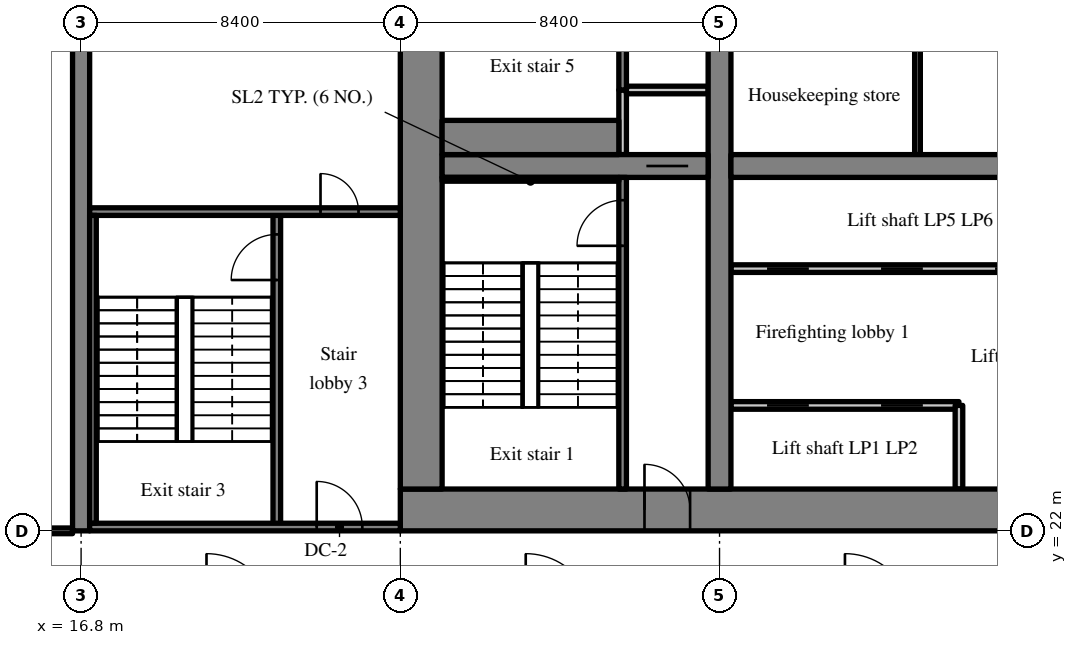
"""IFC4 building model, lengths in metres.
Left out: names, types, materials, properties, quantities, classifications, styles, units other than length and angle.
Written with IfcOpenShell. Run it as: python <this file> out.ifc"""

import sys

from ifc_helpers import new_model, si_unit, direction, frame, frame_2d, origin, place, context, subcontext, project, spatial, rectangle, extrude, source, transform, mapped, element, fill, save


model = new_model("IFC4")
c1 = context("Model", 3, precision=1e-05, world=origin(), true_north=direction((0.0, 1.0)))
c2 = subcontext(c1, "Body", "Model", "MODEL_VIEW")
j1 = project(units=[si_unit("LENGTHUNIT", "METRE"), si_unit("PLANEANGLEUNIT", "RADIAN")], contexts=[c1])
p1 = place(None, origin())
s1 = spatial("IfcSite", under=j1, at=p1, CompositionType="ELEMENT")
p2 = place(p1, origin())
s2 = spatial("IfcBuilding", under=s1, at=p2, CompositionType="ELEMENT")
p3 = place(p2, frame((0.0, 0.0, 6.0)))
s3 = spatial("IfcBuildingStorey", under=s2, at=p3, CompositionType="ELEMENT", Elevation=6.0)
m1 = source(origin(), c2, "Body", "SweptSolid", [
    extrude(rectangle(XDim=50.4, YDim=1.1, at=frame_2d((25.2, 0.0))), origin(), (0.0, 0.0, 1.0), 5.12),
])
p4 = place(p3, frame((25.2, 22.55, 0.0), z_axis=(0.0, 0.0, 1.0), x_axis=(1.0, 0.0, 0.0)))
e1 = element("IfcWall", 1, at=p4, inside=s3, PredefinedType="SHEAR", context=c2, shape_type="MappedRepresentation", body=[
    mapped(m1, transform((0.0, 0.0, 0.0), scale=1.0)),
])
m2 = source(origin(), c2, "Body", "SweptSolid", [
    extrude(rectangle(XDim=1.8, YDim=2.1, at=frame_2d((0.9, 1.05))), frame((0.0, 0.56, 0.0), z_axis=(0.0, -1.0, 0.0), x_axis=(1.0, 0.0, 0.0)), (0.0, 0.0, 1.0), 1.12),
])
p5 = place(p4, frame((15.9, 0.0, 0.0)))
e2 = element("IfcOpeningElement", 2, at=p5, cuts=e1, PredefinedType="OPENING", context=c2, shape_type="MappedRepresentation", body=[
    mapped(m2, transform((0.0, 0.0, 0.0), scale=1.0)),
])
m3 = source(origin(), c2, "Body", "SweptSolid", [
    extrude(rectangle(XDim=1.2, YDim=2.1, at=frame_2d((0.6, 1.05))), frame((0.0, 0.56, 0.0), z_axis=(0.0, -1.0, 0.0), x_axis=(1.0, 0.0, 0.0)), (0.0, 0.0, 1.0), 1.12),
])
p6 = place(p4, frame((27.0, 0.0, 0.0)))
e3 = element("IfcOpeningElement", 3, at=p6, cuts=e1, PredefinedType="OPENING", context=c2, shape_type="MappedRepresentation", body=[
    mapped(m3, transform((0.0, 0.0, 0.0), scale=1.0)),
])
m4 = source(origin(), c2, "Body", "SweptSolid", [
    extrude(rectangle(XDim=0.9, YDim=2.1, at=frame_2d((0.45, 1.05))), frame((0.0, 0.56, 0.0), z_axis=(0.0, -1.0, 0.0), x_axis=(1.0, 0.0, 0.0)), (0.0, 0.0, 1.0), 1.12),
])
p7 = place(p4, frame((34.5, 0.0, 0.0)))
e4 = element("IfcOpeningElement", 4, at=p7, cuts=e1, PredefinedType="OPENING", context=c2, shape_type="MappedRepresentation", body=[
    mapped(m4, transform((0.0, 0.0, 0.0), scale=1.0)),
])
p8 = place(p4, frame((31.5, 0.0, 0.0)))
e5 = element("IfcOpeningElement", 5, at=p8, cuts=e1, PredefinedType="OPENING", context=c2, shape_type="MappedRepresentation", body=[
    mapped(m4, transform((0.0, 0.0, 0.0), scale=1.0)),
])
p9 = place(p4, frame((39.75, 0.0, 0.0)))
e6 = element("IfcOpeningElement", 6, at=p9, cuts=e1, PredefinedType="OPENING", context=c2, shape_type="MappedRepresentation", body=[
    mapped(m4, transform((0.0, 0.0, 0.0), scale=1.0)),
])
p10 = place(p4, frame((36.75, 0.0, 0.0)))
e7 = element("IfcOpeningElement", 7, at=p10, cuts=e1, PredefinedType="OPENING", context=c2, shape_type="MappedRepresentation", body=[
    mapped(m4, transform((0.0, 0.0, 0.0), scale=1.0)),
])
p11 = place(p4, frame((6.425, 0.0, 0.0)))
e8 = element("IfcOpeningElement", 8, at=p11, cuts=e1, PredefinedType="OPENING", context=c2, shape_type="MappedRepresentation", body=[
    mapped(m3, transform((0.0, 0.0, 0.0), scale=1.0)),
])
p12 = place(p4, frame((47.675, 0.0, 0.0)))
e9 = element("IfcOpeningElement", 9, at=p12, cuts=e1, PredefinedType="OPENING", context=c2, shape_type="MappedRepresentation", body=[
    mapped(m3, transform((0.0, 0.0, 0.0), scale=1.0)),
])
m5 = source(origin(), c2, "Body", "SweptSolid", [
    extrude(rectangle(XDim=17.8, YDim=1.1, at=frame_2d((8.9, 0.0))), origin(), (0.0, 0.0, 1.0), 5.12),
])
p13 = place(p3, frame((25.75, 23.1, 0.0), z_axis=(0.0, 0.0, 1.0), x_axis=(0.0, 1.0, 0.0)))
e10 = element("IfcWall", 10, at=p13, inside=s3, PredefinedType="SHEAR", context=c2, shape_type="MappedRepresentation", body=[
    mapped(m5, transform((0.0, 0.0, 0.0), scale=1.0)),
])
m6 = source(origin(), c2, "Body", "SweptSolid", [
    extrude(rectangle(XDim=17.8, YDim=0.6, at=frame_2d((8.9, 0.0))), origin(), (0.0, 0.0, 1.0), 5.12),
])
p14 = place(p3, frame((33.6, 23.1, 0.0), z_axis=(0.0, 0.0, 1.0), x_axis=(0.0, 1.0, 0.0)))
e11 = element("IfcWall", 11, at=p14, inside=s3, PredefinedType="SHEAR", context=c2, shape_type="MappedRepresentation", body=[
    mapped(m6, transform((0.0, 0.0, 0.0), scale=1.0)),
])
m7 = source(origin(), c2, "Body", "SweptSolid", [
    extrude(rectangle(XDim=1.1, YDim=2.1, at=frame_2d((0.55, 1.05))), frame((0.0, 0.31, 0.0), z_axis=(0.0, -1.0, 0.0), x_axis=(1.0, 0.0, 0.0)), (0.0, 0.0, 1.0), 0.62),
])
p15 = place(p14, frame((12.35, 0.0, 0.0)))
e12 = element("IfcOpeningElement", 12, at=p15, cuts=e11, PredefinedType="OPENING", context=c2, shape_type="MappedRepresentation", body=[
    mapped(m7, transform((0.0, 0.0, 0.0), scale=1.0)),
])
m8 = source(origin(), c2, "Body", "SweptSolid", [
    extrude(rectangle(XDim=7.0, YDim=0.6, at=frame_2d((3.5, 0.0))), origin(), (0.0, 0.0, 1.0), 5.12),
])
p16 = place(p3, frame((26.3, 31.6, 0.0), z_axis=(0.0, 0.0, 1.0), x_axis=(1.0, 0.0, 0.0)))
e13 = element("IfcWall", 13, at=p16, inside=s3, PredefinedType="SHEAR", context=c2, shape_type="MappedRepresentation", body=[
    mapped(m8, transform((0.0, 0.0, 0.0), scale=1.0)),
])
p17 = place(p16, frame((5.375, 0.0, 0.0)))
e14 = element("IfcOpeningElement", 14, at=p17, cuts=e13, PredefinedType="OPENING", context=c2, shape_type="MappedRepresentation", body=[
    mapped(m7, transform((0.0, 0.0, 0.0), scale=1.0)),
])
m9 = source(origin(), c2, "Body", "SweptSolid", [
    extrude(rectangle(XDim=16.2, YDim=0.6, at=frame_2d((8.1, 0.0))), origin(), (0.0, 0.0, 1.0), 5.12),
])
p18 = place(p3, frame((33.9, 31.6, 0.0), z_axis=(0.0, 0.0, 1.0), x_axis=(1.0, 0.0, 0.0)))
e15 = element("IfcWall", 15, at=p18, inside=s3, PredefinedType="SHEAR", context=c2, shape_type="MappedRepresentation", body=[
    mapped(m9, transform((0.0, 0.0, 0.0), scale=1.0)),
])
m10 = source(origin(), c2, "Body", "SweptSolid", [
    extrude(rectangle(XDim=1.0, YDim=2.1, at=frame_2d((0.5, 1.05))), frame((0.0, 0.31, 0.0), z_axis=(0.0, -1.0, 0.0), x_axis=(1.0, 0.0, 0.0)), (0.0, 0.0, 1.0), 0.62),
])
p19 = place(p18, frame((14.65, 0.0, 0.0)))
e16 = element("IfcOpeningElement", 16, at=p19, cuts=e15, PredefinedType="OPENING", context=c2, shape_type="MappedRepresentation", body=[
    mapped(m10, transform((0.0, 0.0, 0.0), scale=1.0)),
])
m11 = source(origin(), c2, "Body", "SweptSolid", [
    extrude(rectangle(XDim=20.0, YDim=0.45, at=frame_2d((10.0, 0.0))), origin(), (0.0, 0.0, 1.0), 5.12),
])
p20 = place(p3, frame((16.8, 22.0, 0.0), z_axis=(0.0, 0.0, 1.0), x_axis=(0.0, 1.0, 0.0)))
e17 = element("IfcWall", 17, at=p20, inside=s3, PredefinedType="SHEAR", context=c2, shape_type="MappedRepresentation", body=[
    mapped(m11, transform((0.0, 0.0, 0.0), scale=1.0)),
])
m12 = source(origin(), c2, "Body", "SweptSolid", [
    extrude(rectangle(XDim=6.0, YDim=0.2, at=frame_2d((3.0, 0.0))), origin(), (0.0, 0.0, 1.0), 5.12),
])
p21 = place(p3, frame((33.9, 25.3, 0.0), z_axis=(0.0, 0.0, 1.0), x_axis=(1.0, 0.0, 0.0)))
e18 = element("IfcWall", 18, at=p21, inside=s3, PredefinedType="SOLIDWALL", context=c2, shape_type="MappedRepresentation", body=[
    mapped(m12, transform((0.0, 0.0, 0.0), scale=1.0)),
])
m13 = source(origin(), c2, "Body", "SweptSolid", [
    extrude(rectangle(XDim=1.1, YDim=2.1, at=frame_2d((0.55, 1.05))), frame((0.0, 0.11, 0.0), z_axis=(0.0, -1.0, 0.0), x_axis=(1.0, 0.0, 0.0)), (0.0, 0.0, 1.0), 0.22),
])
p22 = place(p21, frame((0.95, 0.0, 0.0)))
e19 = element("IfcOpeningElement", 19, at=p22, cuts=e18, PredefinedType="OPENING", context=c2, shape_type="MappedRepresentation", body=[
    mapped(m13, transform((0.0, 0.0, 0.0), scale=1.0)),
])
p23 = place(p21, frame((3.95, 0.0, 0.0)))
e20 = element("IfcOpeningElement", 20, at=p23, cuts=e18, PredefinedType="OPENING", context=c2, shape_type="MappedRepresentation", body=[
    mapped(m13, transform((0.0, 0.0, 0.0), scale=1.0)),
])
m14 = source(origin(), c2, "Body", "SweptSolid", [
    extrude(rectangle(XDim=12.0, YDim=0.2, at=frame_2d((6.0, 0.0))), origin(), (0.0, 0.0, 1.0), 5.12),
])
p24 = place(p3, frame((33.9, 28.9, 0.0), z_axis=(0.0, 0.0, 1.0), x_axis=(1.0, 0.0, 0.0)))
e21 = element("IfcWall", 21, at=p24, inside=s3, PredefinedType="SOLIDWALL", context=c2, shape_type="MappedRepresentation", body=[
    mapped(m14, transform((0.0, 0.0, 0.0), scale=1.0)),
])
p25 = place(p24, frame((0.95, 0.0, 0.0)))
e22 = element("IfcOpeningElement", 22, at=p25, cuts=e21, PredefinedType="OPENING", context=c2, shape_type="MappedRepresentation", body=[
    mapped(m13, transform((0.0, 0.0, 0.0), scale=1.0)),
])
p26 = place(p24, frame((3.95, 0.0, 0.0)))
e23 = element("IfcOpeningElement", 23, at=p26, cuts=e21, PredefinedType="OPENING", context=c2, shape_type="MappedRepresentation", body=[
    mapped(m13, transform((0.0, 0.0, 0.0), scale=1.0)),
])
p27 = place(p24, frame((6.95, 0.0, 0.0)))
e24 = element("IfcOpeningElement", 24, at=p27, cuts=e21, PredefinedType="OPENING", context=c2, shape_type="MappedRepresentation", body=[
    mapped(m13, transform((0.0, 0.0, 0.0), scale=1.0)),
])
p28 = place(p24, frame((9.95, 0.0, 0.0)))
e25 = element("IfcOpeningElement", 25, at=p28, cuts=e21, PredefinedType="OPENING", context=c2, shape_type="MappedRepresentation", body=[
    mapped(m13, transform((0.0, 0.0, 0.0), scale=1.0)),
])
m15 = source(origin(), c2, "Body", "SweptSolid", [
    extrude(rectangle(XDim=2.2, YDim=0.2, at=frame_2d((1.1, 0.0))), origin(), (0.0, 0.0, 1.0), 5.12),
])
p29 = place(p3, frame((39.9, 23.1, 0.0), z_axis=(0.0, 0.0, 1.0), x_axis=(0.0, 1.0, 0.0)))
e26 = element("IfcWall", 26, at=p29, inside=s3, PredefinedType="SOLIDWALL", context=c2, shape_type="MappedRepresentation", body=[
    mapped(m15, transform((0.0, 0.0, 0.0), scale=1.0)),
])
m16 = source(origin(), c2, "Body", "SweptSolid", [
    extrude(rectangle(XDim=3.1, YDim=0.15, at=frame_2d((1.55, 0.0))), origin(), (0.0, 0.0, 1.0), 5.12),
])
p30 = place(p3, frame((38.809, 31.9, 0.0), z_axis=(0.0, 0.0, 1.0), x_axis=(0.0, 1.0, 0.0)))
e27 = element("IfcWall", 27, at=p30, inside=s3, PredefinedType="PARTITIONING", context=c2, shape_type="MappedRepresentation", body=[
    mapped(m16, transform((0.0, 0.0, 0.0), scale=1.0)),
])
m17 = source(origin(), c2, "Body", "SweptSolid", [
    extrude(rectangle(XDim=8.2, YDim=0.2, at=frame_2d((4.1, 0.0))), origin(), (0.0, 0.0, 1.0), 5.12),
])
p31 = place(p3, frame((31.05, 23.1, 0.0), z_axis=(0.0, 0.0, 1.0), x_axis=(0.0, 1.0, 0.0)))
e28 = element("IfcWall", 28, at=p31, inside=s3, PredefinedType="SOLIDWALL", context=c2, shape_type="MappedRepresentation", body=[
    mapped(m17, transform((0.0, 0.0, 0.0), scale=1.0)),
])
m18 = source(origin(), c2, "Body", "SweptSolid", [
    extrude(rectangle(XDim=1.2, YDim=2.1, at=frame_2d((0.6, 1.05))), frame((0.0, 0.11, 0.0), z_axis=(0.0, -1.0, 0.0), x_axis=(1.0, 0.0, 0.0)), (0.0, 0.0, 1.0), 0.22),
])
p32 = place(p31, frame((6.4, 0.0, 0.0)))
e29 = element("IfcOpeningElement", 29, at=p32, cuts=e28, PredefinedType="OPENING", context=c2, shape_type="MappedRepresentation", body=[
    mapped(m18, transform((0.0, 0.0, 0.0), scale=1.0)),
])
m19 = source(origin(), c2, "Body", "SweptSolid", [
    extrude(rectangle(XDim=1.7, YDim=0.2, at=frame_2d((0.85, 0.0))), origin(), (0.0, 0.0, 1.0), 5.12),
])
p33 = place(p3, frame((31.05, 31.9, 0.0), z_axis=(0.0, 0.0, 1.0), x_axis=(0.0, 1.0, 0.0)))
e30 = element("IfcWall", 30, at=p33, inside=s3, PredefinedType="SOLIDWALL", context=c2, shape_type="MappedRepresentation", body=[
    mapped(m19, transform((0.0, 0.0, 0.0), scale=1.0)),
])
m20 = source(origin(), c2, "Body", "SweptSolid", [
    extrude(rectangle(XDim=2.15, YDim=0.2, at=frame_2d((1.075, 0.0))), origin(), (0.0, 0.0, 1.0), 5.12),
])
p34 = place(p3, frame((31.15, 33.6, 0.0), z_axis=(0.0, 0.0, 1.0), x_axis=(1.0, 0.0, 0.0)))
e31 = element("IfcWall", 31, at=p34, inside=s3, PredefinedType="SOLIDWALL", context=c2, shape_type="MappedRepresentation", body=[
    mapped(m20, transform((0.0, 0.0, 0.0), scale=1.0)),
])
m21 = source(origin(), c2, "Body", "SweptSolid", [
    extrude(rectangle(XDim=7.3, YDim=0.2, at=frame_2d((3.65, 0.0))), origin(), (0.0, 0.0, 1.0), 5.12),
])
p35 = place(p3, frame((31.05, 33.6, 0.0), z_axis=(0.0, 0.0, 1.0), x_axis=(0.0, 1.0, 0.0)))
e32 = element("IfcWall", 32, at=p35, inside=s3, PredefinedType="SOLIDWALL", context=c2, shape_type="MappedRepresentation", body=[
    mapped(m21, transform((0.0, 0.0, 0.0), scale=1.0)),
])
m22 = source(origin(), c2, "Body", "SweptSolid", [
    extrude(rectangle(XDim=1.8, YDim=2.1, at=frame_2d((0.9, 1.05))), frame((0.0, 0.11, 0.0), z_axis=(0.0, -1.0, 0.0), x_axis=(1.0, 0.0, 0.0)), (0.0, 0.0, 1.0), 0.22),
])
p36 = place(p35, frame((5.3, 0.0, 0.0)))
e33 = element("IfcOpeningElement", 33, at=p36, cuts=e32, PredefinedType="OPENING", context=c2, shape_type="MappedRepresentation", body=[
    mapped(m22, transform((0.0, 0.0, 0.0), scale=1.0)),
])
m23 = source(origin(), c2, "Body", "SweptSolid", [
    extrude(rectangle(XDim=8.3, YDim=0.2, at=frame_2d((4.15, 0.0))), origin(), (0.0, 0.0, 1.0), 5.12),
])
p37 = place(p3, frame((21.95, 22.1, 0.0), z_axis=(0.0, 0.0, 1.0), x_axis=(0.0, 1.0, 0.0)))
e34 = element("IfcWall", 34, at=p37, inside=s3, PredefinedType="SOLIDWALL", context=c2, shape_type="MappedRepresentation", body=[
    mapped(m23, transform((0.0, 0.0, 0.0), scale=1.0)),
])
p38 = place(p37, frame((6.5, 0.0, 0.0)))
e35 = element("IfcOpeningElement", 35, at=p38, cuts=e34, PredefinedType="OPENING", context=c2, shape_type="MappedRepresentation", body=[
    mapped(m18, transform((0.0, 0.0, 0.0), scale=1.0)),
])
m24 = source(origin(), c2, "Body", "SweptSolid", [
    extrude(rectangle(XDim=8.175, YDim=0.2, at=frame_2d((4.087, 0.0))), origin(), (0.0, 0.0, 1.0), 5.12),
])
p39 = place(p3, frame((17.025, 22.1, 0.0), z_axis=(0.0, 0.0, 1.0), x_axis=(1.0, 0.0, 0.0)))
e36 = element("IfcWall", 36, at=p39, inside=s3, PredefinedType="SOLIDWALL", context=c2, shape_type="MappedRepresentation", body=[
    mapped(m24, transform((0.0, 0.0, 0.0), scale=1.0)),
])
p40 = place(p39, frame((5.975, 0.0, 0.0)))
e37 = element("IfcOpeningElement", 37, at=p40, cuts=e36, PredefinedType="OPENING", context=c2, shape_type="MappedRepresentation", body=[
    mapped(m18, transform((0.0, 0.0, 0.0), scale=1.0)),
])
p41 = place(p3, frame((17.025, 30.4, 0.0), z_axis=(0.0, 0.0, 1.0), x_axis=(1.0, 0.0, 0.0)))
e38 = element("IfcWall", 38, at=p41, inside=s3, PredefinedType="SOLIDWALL", context=c2, shape_type="MappedRepresentation", body=[
    mapped(m24, transform((0.0, 0.0, 0.0), scale=1.0)),
])
m25 = source(origin(), c2, "Body", "SweptSolid", [
    extrude(rectangle(XDim=1.0, YDim=2.1, at=frame_2d((0.5, 1.05))), frame((0.0, 0.11, 0.0), z_axis=(0.0, -1.0, 0.0), x_axis=(1.0, 0.0, 0.0)), (0.0, 0.0, 1.0), 0.22),
])
p42 = place(p41, frame((6.075, 0.0, 0.0)))
e39 = element("IfcOpeningElement", 39, at=p42, cuts=e38, PredefinedType="OPENING", context=c2, shape_type="MappedRepresentation", body=[
    mapped(m25, transform((0.0, 0.0, 0.0), scale=1.0)),
])
m26 = source(origin(), c2, "Body", "SweptSolid", [
    extrude(rectangle(XDim=4.65, YDim=0.1, at=frame_2d((2.325, 0.0))), origin(), (0.0, 0.0, 1.0), 5.12),
])
p43 = place(p3, frame((26.3, 31.25, 0.0), z_axis=(0.0, 0.0, 1.0), x_axis=(1.0, 0.0, 0.0)))
e40 = element("IfcWall", 40, at=p43, inside=s3, PredefinedType="SOLIDWALL", context=c2, shape_type="MappedRepresentation", body=[
    mapped(m26, transform((0.0, 0.0, 0.0), scale=1.0)),
])
m27 = source(origin(), c2, "Body", "SweptSolid", [
    extrude(rectangle(XDim=8.1, YDim=0.175, at=frame_2d((4.05, 0.0))), origin(), (0.0, 0.0, 1.0), 5.12),
])
p44 = place(p3, frame((17.112, 22.2, 0.0), z_axis=(0.0, 0.0, 1.0), x_axis=(0.0, 1.0, 0.0)))
e41 = element("IfcWall", 41, at=p44, inside=s3, PredefinedType="SOLIDWALL", context=c2, shape_type="MappedRepresentation", body=[
    mapped(m27, transform((0.0, 0.0, 0.0), scale=1.0)),
])
m28 = source(origin(), c2, "Body", "SweptSolid", [
    extrude(rectangle(XDim=4.65, YDim=0.9, at=frame_2d((2.325, 0.0))), origin(), (0.0, 0.0, 1.0), 5.12),
])
p45 = place(p3, frame((26.3, 32.35, 0.0), z_axis=(0.0, 0.0, 1.0), x_axis=(1.0, 0.0, 0.0)))
e42 = element("IfcWall", 42, at=p45, inside=s3, PredefinedType="SOLIDWALL", context=c2, shape_type="MappedRepresentation", body=[
    mapped(m28, transform((0.0, 0.0, 0.0), scale=1.0)),
])
m29 = source(origin(), c2, "Body", "SweptSolid", [
    extrude(rectangle(XDim=7.95, YDim=0.15, at=frame_2d((3.975, 0.0))), origin(), (0.0, 0.0, 1.0), 4.42),
])
p46 = place(p3, frame((8.625, 22.0, 0.0), z_axis=(0.0, 0.0, 1.0), x_axis=(1.0, 0.0, 0.0)))
e43 = element("IfcWall", 43, at=p46, inside=s3, PredefinedType="PARTITIONING", context=c2, shape_type="MappedRepresentation", body=[
    mapped(m29, transform((0.0, 0.0, 0.0), scale=1.0)),
])
m30 = source(origin(), c2, "Body", "SweptSolid", [
    extrude(rectangle(XDim=1.8, YDim=2.1, at=frame_2d((0.9, 1.05))), frame((0.0, 0.085, 0.0), z_axis=(0.0, -1.0, 0.0), x_axis=(1.0, 0.0, 0.0)), (0.0, 0.0, 1.0), 0.17),
])
p47 = place(p46, frame((3.075, 0.0, 0.0)))
e44 = element("IfcOpeningElement", 44, at=p47, cuts=e43, PredefinedType="OPENING", context=c2, shape_type="MappedRepresentation", body=[
    mapped(m30, transform((0.0, 0.0, 0.0), scale=1.0)),
])
m31 = source(origin(), c2, "Body", "SweptSolid", [
    extrude(rectangle(XDim=1.1, YDim=2.1, at=frame_2d((0.55, 1.05))), frame((0.0, 0.025, 0.0), z_axis=(0.0, -1.0, 0.0), x_axis=(1.0, 0.0, 0.0)), (0.0, 0.0, 1.0), 0.05),
])
p48 = place(p22, origin())
e45 = element("IfcDoor", 45, at=p48, inside=s3, OperationType="SLIDING_TO_LEFT", PredefinedType="DOOR", context=c2, shape_type="MappedRepresentation", body=[
    mapped(m31, transform((0.0, 0.0, 0.0), scale=1.0)),
])
fill(e19, e45)
p49 = place(p23, origin())
e46 = element("IfcDoor", 46, at=p49, inside=s3, OperationType="SLIDING_TO_RIGHT", PredefinedType="DOOR", context=c2, shape_type="MappedRepresentation", body=[
    mapped(m31, transform((0.0, 0.0, 0.0), scale=1.0)),
])
fill(e20, e46)
p50 = place(p25, origin())
e47 = element("IfcDoor", 47, at=p50, inside=s3, OperationType="SLIDING_TO_LEFT", PredefinedType="DOOR", context=c2, shape_type="MappedRepresentation", body=[
    mapped(m31, transform((0.0, 0.0, 0.0), scale=1.0)),
])
fill(e22, e47)
p51 = place(p26, origin())
e48 = element("IfcDoor", 48, at=p51, inside=s3, OperationType="SLIDING_TO_RIGHT", PredefinedType="DOOR", context=c2, shape_type="MappedRepresentation", body=[
    mapped(m31, transform((0.0, 0.0, 0.0), scale=1.0)),
])
fill(e23, e48)
p52 = place(p27, origin())
e49 = element("IfcDoor", 49, at=p52, inside=s3, OperationType="SLIDING_TO_LEFT", PredefinedType="DOOR", context=c2, shape_type="MappedRepresentation", body=[
    mapped(m31, transform((0.0, 0.0, 0.0), scale=1.0)),
])
fill(e24, e49)
m32 = source(origin(), c2, "Body", "SweptSolid", [
    extrude(rectangle(XDim=1.2, YDim=2.1, at=frame_2d((0.6, 1.05))), frame((0.0, 0.025, 0.0), z_axis=(0.0, -1.0, 0.0), x_axis=(1.0, 0.0, 0.0)), (0.0, 0.0, 1.0), 0.05),
])
p53 = place(p32, origin())
e50 = element("IfcDoor", 50, at=p53, inside=s3, OperationType="SINGLE_SWING_LEFT", PredefinedType="DOOR", context=c2, shape_type="MappedRepresentation", body=[
    mapped(m32, transform((0.0, 0.0, 0.0), scale=1.0)),
])
fill(e29, e50)
m33 = source(origin(), c2, "Body", "SweptSolid", [
    extrude(rectangle(XDim=1.2, YDim=2.1, at=frame_2d((0.6, 1.05))), frame((0.0, 0.325, 0.0), z_axis=(0.0, -1.0, 0.0), x_axis=(1.0, 0.0, 0.0)), (0.0, 0.0, 1.0), 0.05),
])
p54 = place(p11, origin())
e51 = element("IfcDoor", 51, at=p54, inside=s3, OperationType="SINGLE_SWING_LEFT", PredefinedType="DOOR", context=c2, shape_type="MappedRepresentation", body=[
    mapped(m33, transform((0.0, 0.0, 0.0), scale=1.0)),
])
fill(e8, e51)
p55 = place(p17, origin())
e52 = element("IfcDoor", 52, at=p55, inside=s3, OperationType="SLIDING_TO_RIGHT", PredefinedType="DOOR", context=c2, shape_type="MappedRepresentation", body=[
    mapped(m31, transform((0.0, 0.0, 0.0), scale=1.0)),
])
fill(e14, e52)
p56 = place(p38, origin())
e53 = element("IfcDoor", 53, at=p56, inside=s3, OperationType="SINGLE_SWING_LEFT", PredefinedType="DOOR", context=c2, shape_type="MappedRepresentation", body=[
    mapped(m32, transform((0.0, 0.0, 0.0), scale=1.0)),
])
fill(e35, e53)
p57 = place(p40, origin())
e54 = element("IfcDoor", 54, at=p57, inside=s3, OperationType="SINGLE_SWING_LEFT", PredefinedType="DOOR", context=c2, shape_type="MappedRepresentation", body=[
    mapped(m32, transform((0.0, 0.0, 0.0), scale=1.0)),
])
fill(e37, e54)
m34 = source(origin(), c2, "Body", "SweptSolid", [
    extrude(rectangle(XDim=1.0, YDim=2.1, at=frame_2d((0.5, 1.05))), frame((0.0, 0.025, 0.0), z_axis=(0.0, -1.0, 0.0), x_axis=(1.0, 0.0, 0.0)), (0.0, 0.0, 1.0), 0.05),
])
p58 = place(p42, origin())
e55 = element("IfcDoor", 55, at=p58, inside=s3, OperationType="SINGLE_SWING_LEFT", PredefinedType="DOOR", context=c2, shape_type="MappedRepresentation", body=[
    mapped(m34, transform((0.0, 0.0, 0.0), scale=1.0)),
])
fill(e39, e55)
save(model, sys.argv[1])
